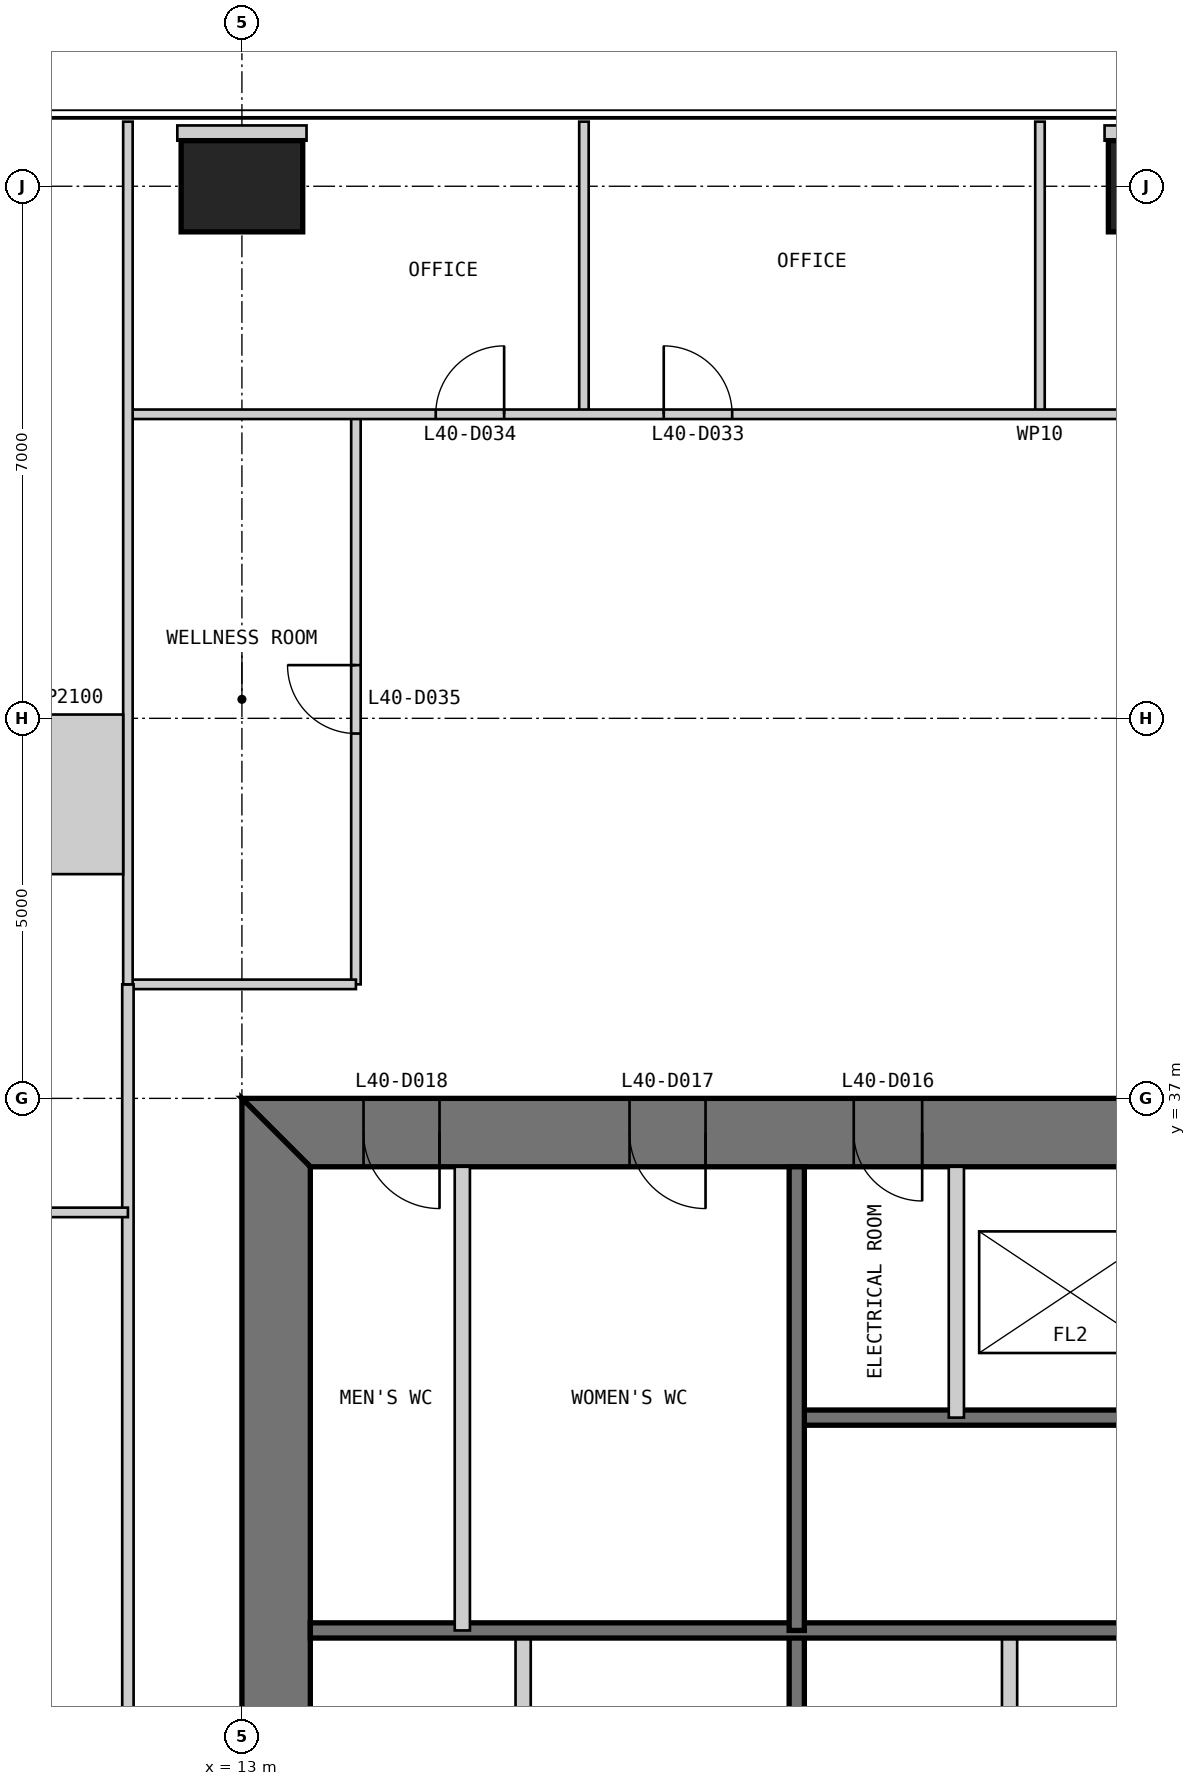
"""IFC4 building model, lengths in metres.
Left out: names, types, materials, properties, quantities, classifications, styles, units other than length and angle.
Written with IfcOpenShell. Run it as: python <this file> out.ifc"""

import sys

from ifc_helpers import new_model, si_unit, direction, frame, frame_2d, origin, origin_2d, place, context, subcontext, project, spatial, polyline, rectangle, outline, extrude, element, fill, save


model = new_model("IFC4")
c1 = context("Model", 3, precision=1e-05, world=origin(), true_north=direction((0.0, 1.0)))
c2 = subcontext(c1, "Body", "Model", "MODEL_VIEW")
j1 = project(units=[si_unit("LENGTHUNIT", "METRE"), si_unit("PLANEANGLEUNIT", "RADIAN")], contexts=[c1])
p1 = place(None, origin())
s1 = spatial("IfcSite", under=j1, at=p1, CompositionType="ELEMENT")
p2 = place(p1, origin())
s2 = spatial("IfcBuilding", under=s1, at=p2, CompositionType="ELEMENT")
p3 = place(p2, frame((0.0, 0.0, 173.8)))
s3 = spatial("IfcBuildingStorey", under=s2, at=p3, CompositionType="ELEMENT", Elevation=173.8)
p4 = place(p3, frame((25.0, 49.0, 0.0), z_axis=(0.0, 0.0, 1.0), x_axis=(1.0, 0.0, 0.0)))
e1 = element("IfcColumn", 1, at=p4, inside=s3, PredefinedType="COLUMN", context=c2, shape_type="SweptSolid", body=[
    extrude(rectangle(XDim=1.2, YDim=1.2, at=origin_2d()), origin(), (0.0, 0.0, 1.0), 4.0),
])
p5 = place(p3, frame((13.0, 49.0, 0.0), z_axis=(0.0, 0.0, 1.0), x_axis=(1.0, 0.0, 0.0)))
e2 = element("IfcColumn", 2, at=p5, inside=s3, PredefinedType="COLUMN", context=c2, shape_type="SweptSolid", body=[
    extrude(rectangle(XDim=1.6, YDim=1.2, at=origin_2d()), origin(), (0.0, 0.0, 1.0), 4.0),
])
p6 = place(p3, frame((37.0, 36.55, 0.0), z_axis=(0.0, 0.0, 1.0), x_axis=(-1.0, 0.0, 0.0)))
e3 = element("IfcWall", 3, at=p6, inside=s3, PredefinedType="SHEAR", context=c2, shape_type="SweptSolid", body=[
    extrude(outline(polyline([(0.0, -0.45), (24.0, -0.45), (23.1, 0.45), (0.9, 0.45), (0.0, -0.45)])), origin(), (0.0, 0.0, 1.0), 4.0),
])
p7 = place(p6, frame((4.9, 0.0, 0.0)))
e4 = element("IfcOpeningElement", 4, at=p7, cuts=e3, PredefinedType="OPENING", context=c2, shape_type="SweptSolid", body=[
    extrude(rectangle(XDim=1.0, YDim=2.2, at=frame_2d((0.5, 1.1))), frame((0.0, 0.46, 0.0), z_axis=(0.0, -1.0, 0.0), x_axis=(1.0, 0.0, 0.0)), (0.0, 0.0, 1.0), 0.92),
])
p8 = place(p6, frame((8.9, 0.0, 0.0)))
e5 = element("IfcOpeningElement", 5, at=p8, cuts=e3, PredefinedType="OPENING", context=c2, shape_type="SweptSolid", body=[
    extrude(rectangle(XDim=1.1, YDim=2.2, at=frame_2d((0.55, 1.1))), frame((0.0, 0.46, 0.0), z_axis=(0.0, -1.0, 0.0), x_axis=(1.0, 0.0, 0.0)), (0.0, 0.0, 1.0), 0.92),
])
p9 = place(p6, frame((15.05, 0.0, 0.0)))
e6 = element("IfcOpeningElement", 6, at=p9, cuts=e3, PredefinedType="OPENING", context=c2, shape_type="SweptSolid", body=[
    extrude(rectangle(XDim=0.9, YDim=2.2, at=frame_2d((0.45, 1.1))), frame((0.0, 0.46, 0.0), z_axis=(0.0, -1.0, 0.0), x_axis=(1.0, 0.0, 0.0)), (0.0, 0.0, 1.0), 0.92),
])
p10 = place(p6, frame((17.9, 0.0, 0.0)))
e7 = element("IfcOpeningElement", 7, at=p10, cuts=e3, PredefinedType="OPENING", context=c2, shape_type="SweptSolid", body=[
    extrude(rectangle(XDim=1.0, YDim=2.2, at=frame_2d((0.5, 1.1))), frame((0.0, 0.46, 0.0), z_axis=(0.0, -1.0, 0.0), x_axis=(1.0, 0.0, 0.0)), (0.0, 0.0, 1.0), 0.92),
])
p11 = place(p6, frame((21.4, 0.0, 0.0)))
e8 = element("IfcOpeningElement", 8, at=p11, cuts=e3, PredefinedType="OPENING", context=c2, shape_type="SweptSolid", body=[
    extrude(rectangle(XDim=1.0, YDim=2.2, at=frame_2d((0.5, 1.1))), frame((0.0, 0.46, 0.0), z_axis=(0.0, -1.0, 0.0), x_axis=(1.0, 0.0, 0.0)), (0.0, 0.0, 1.0), 0.92),
])
p12 = place(p3, frame((13.45, 36.1, 0.0), z_axis=(0.0, 0.0, 1.0), x_axis=(0.0, -1.0, 0.0)))
e9 = element("IfcWall", 9, at=p12, inside=s3, PredefinedType="SHEAR", context=c2, shape_type="SweptSolid", body=[
    extrude(outline(polyline([(-0.9, -0.45), (23.1, -0.45), (22.2, 0.45), (0.0, 0.45), (-0.9, -0.45)])), origin(), (0.0, 0.0, 1.0), 4.0),
])
p13 = place(p12, frame((20.2, 0.0, 0.0)))
e10 = element("IfcOpeningElement", 10, at=p13, cuts=e9, PredefinedType="OPENING", context=c2, shape_type="SweptSolid", body=[
    extrude(rectangle(XDim=1.0, YDim=2.2, at=frame_2d((0.5, 1.1))), frame((0.0, 0.46, 0.0), z_axis=(0.0, -1.0, 0.0), x_axis=(1.0, 0.0, 0.0)), (0.0, 0.0, 1.0), 0.92),
])
p14 = place(p12, frame((17.25, 0.0, 0.0)))
e11 = element("IfcOpeningElement", 11, at=p14, cuts=e9, PredefinedType="OPENING", context=c2, shape_type="SweptSolid", body=[
    extrude(rectangle(XDim=0.9, YDim=2.2, at=frame_2d((0.45, 1.1))), frame((0.0, 0.46, 0.0), z_axis=(0.0, -1.0, 0.0), x_axis=(1.0, 0.0, 0.0)), (0.0, 0.0, 1.0), 0.92),
])
p15 = place(p3, frame((16.7, 13.9, 0.0), z_axis=(0.0, 0.0, 1.0), x_axis=(0.0, 1.0, 0.0)))
e12 = element("IfcWall", 12, at=p15, inside=s3, PredefinedType="PARTITIONING", context=c2, shape_type="SweptSolid", body=[
    extrude(rectangle(XDim=16.1, YDim=0.2, at=frame_2d((8.05, 0.0))), origin(), (0.0, 0.0, 1.0), 3.8),
])
p16 = place(p15, frame((7.4, 0.0, 0.0)))
e13 = element("IfcOpeningElement", 13, at=p16, cuts=e12, PredefinedType="OPENING", context=c2, shape_type="SweptSolid", body=[
    extrude(rectangle(XDim=0.9, YDim=2.2, at=frame_2d((0.45, 1.1))), frame((0.0, 0.11, 0.0), z_axis=(0.0, -1.0, 0.0), x_axis=(1.0, 0.0, 0.0)), (0.0, 0.0, 1.0), 0.22),
])
p17 = place(p15, frame((12.4, 0.0, 0.0)))
e14 = element("IfcOpeningElement", 14, at=p17, cuts=e12, PredefinedType="OPENING", context=c2, shape_type="SweptSolid", body=[
    extrude(rectangle(XDim=0.9, YDim=2.2, at=frame_2d((0.45, 1.1))), frame((0.0, 0.11, 0.0), z_axis=(0.0, -1.0, 0.0), x_axis=(1.0, 0.0, 0.0)), (0.0, 0.0, 1.0), 0.22),
])
p18 = place(p3, frame((20.3, 13.9, 0.0), z_axis=(0.0, 0.0, 1.0), x_axis=(0.0, 1.0, 0.0)))
e15 = element("IfcWall", 15, at=p18, inside=s3, PredefinedType="SOLIDWALL", context=c2, shape_type="SweptSolid", body=[
    extrude(rectangle(XDim=16.1, YDim=0.2, at=frame_2d((8.05, 0.0))), origin(), (0.0, 0.0, 1.0), 3.8),
])
p19 = place(p18, frame((6.4, 0.0, 0.0)))
e16 = element("IfcOpeningElement", 16, at=p19, cuts=e15, PredefinedType="OPENING", context=c2, shape_type="SweptSolid", body=[
    extrude(rectangle(XDim=0.9, YDim=2.2, at=frame_2d((0.45, 1.1))), frame((0.0, 0.11, 0.0), z_axis=(0.0, -1.0, 0.0), x_axis=(1.0, 0.0, 0.0)), (0.0, 0.0, 1.0), 0.22),
])
p20 = place(p18, frame((11.4, 0.0, 0.0)))
e17 = element("IfcOpeningElement", 17, at=p20, cuts=e15, PredefinedType="OPENING", context=c2, shape_type="SweptSolid", body=[
    extrude(rectangle(XDim=0.9, YDim=2.2, at=frame_2d((0.45, 1.1))), frame((0.0, 0.11, 0.0), z_axis=(0.0, -1.0, 0.0), x_axis=(1.0, 0.0, 0.0)), (0.0, 0.0, 1.0), 0.22),
])
p21 = place(p3, frame((23.1, 20.0, 0.0), z_axis=(0.0, 0.0, 1.0), x_axis=(0.0, 1.0, 0.0)))
e18 = element("IfcWall", 18, at=p21, inside=s3, PredefinedType="PARTITIONING", context=c2, shape_type="SweptSolid", body=[
    extrude(rectangle(XDim=10.0, YDim=0.2, at=frame_2d((5.0, 0.0))), origin(), (0.0, 0.0, 1.0), 3.8),
])
p22 = place(p3, frame((29.7, 32.8, 0.0), z_axis=(0.0, 0.0, 1.0), x_axis=(-1.0, 0.0, 0.0)))
e19 = element("IfcWall", 19, at=p22, inside=s3, PredefinedType="SOLIDWALL", context=c2, shape_type="SweptSolid", body=[
    extrude(rectangle(XDim=9.4, YDim=0.2, at=frame_2d((4.7, 0.0))), origin(), (0.0, 0.0, 1.0), 3.8),
])
p23 = place(p22, frame((0.25, 0.0, 0.0)))
e20 = element("IfcOpeningElement", 20, at=p23, cuts=e19, PredefinedType="OPENING", context=c2, shape_type="SweptSolid", body=[
    extrude(rectangle(XDim=1.0, YDim=2.2, at=frame_2d((0.5, 1.1))), frame((0.0, 0.11, 0.0), z_axis=(0.0, -1.0, 0.0), x_axis=(1.0, 0.0, 0.0)), (0.0, 0.0, 1.0), 0.22),
])
p24 = place(p3, frame((29.7, 30.0, 0.0), z_axis=(0.0, 0.0, 1.0), x_axis=(-1.0, 0.0, 0.0)))
e21 = element("IfcWall", 21, at=p24, inside=s3, PredefinedType="SOLIDWALL", context=c2, shape_type="SweptSolid", body=[
    extrude(rectangle(XDim=15.8, YDim=0.2, at=frame_2d((7.9, 0.0))), origin(), (0.0, 0.0, 1.0), 3.8),
])
p25 = place(p3, frame((22.4, 36.1, 0.0), z_axis=(0.0, 0.0, 1.0), x_axis=(0.0, -1.0, 0.0)))
e22 = element("IfcWall", 22, at=p25, inside=s3, PredefinedType="PARTITIONING", context=c2, shape_type="SweptSolid", body=[
    extrude(rectangle(XDim=3.3, YDim=0.2, at=frame_2d((1.65, 0.0))), origin(), (0.0, 0.0, 1.0), 3.8),
])
p26 = place(p3, frame((20.3, 36.1, 0.0), z_axis=(0.0, 0.0, 1.0), x_axis=(0.0, -1.0, 0.0)))
e23 = element("IfcWall", 23, at=p26, inside=s3, PredefinedType="SOLIDWALL", context=c2, shape_type="SweptSolid", body=[
    extrude(rectangle(XDim=6.1, YDim=0.2, at=frame_2d((3.05, 0.0))), origin(), (0.0, 0.0, 1.0), 3.8),
])
p27 = place(p3, frame((15.9, 36.1, 0.0), z_axis=(0.0, 0.0, 1.0), x_axis=(0.0, -1.0, 0.0)))
e24 = element("IfcWall", 24, at=p27, inside=s3, PredefinedType="PARTITIONING", context=c2, shape_type="SweptSolid", body=[
    extrude(rectangle(XDim=6.1, YDim=0.2, at=frame_2d((3.05, 0.0))), origin(), (0.0, 0.0, 1.0), 3.8),
])
for number, where, z_axis, x_axis in (
    (25, (23.5, 49.85, 0.0), (0.0, 0.0, 1.0), (0.0, -1.0, 0.0)),
    (26, (17.5, 49.85, 0.0), (0.0, 0.0, 1.0), (0.0, -1.0, 0.0)),
):
    element("IfcWall", number, at=place(p3, frame(where, z_axis=z_axis, x_axis=x_axis)), inside=s3, PredefinedType="PARTITIONING", context=c2, shape_type="SweptSolid", body=[
        extrude(rectangle(XDim=3.85, YDim=0.125, at=frame_2d((1.925, 0.0))), origin(), (0.0, 0.0, 1.0), 3.85),
    ])
p28 = place(p3, frame((14.5, 46.0, 0.0), z_axis=(0.0, 0.0, 1.0), x_axis=(0.0, -1.0, 0.0)))
e27 = element("IfcWall", 27, at=p28, inside=s3, PredefinedType="PARTITIONING", context=c2, shape_type="SweptSolid", body=[
    extrude(rectangle(XDim=7.5, YDim=0.125, at=frame_2d((3.75, 0.0))), origin(), (0.0, 0.0, 1.0), 3.85),
])
p29 = place(p28, frame((3.3, 0.0, 0.0)))
e28 = element("IfcOpeningElement", 28, at=p29, cuts=e27, PredefinedType="OPENING", context=c2, shape_type="SweptSolid", body=[
    extrude(rectangle(XDim=0.9, YDim=2.2, at=frame_2d((0.45, 1.1))), frame((0.0, 0.073, 0.0), z_axis=(0.0, -1.0, 0.0), x_axis=(1.0, 0.0, 0.0)), (0.0, 0.0, 1.0), 0.145),
])
p30 = place(p3, frame((35.5, 46.0, 0.0), z_axis=(0.0, 0.0, 1.0), x_axis=(-1.0, 0.0, 0.0)))
e29 = element("IfcWall", 29, at=p30, inside=s3, PredefinedType="PARTITIONING", context=c2, shape_type="SweptSolid", body=[
    extrude(rectangle(XDim=24.0, YDim=0.125, at=frame_2d((12.0, 0.0))), origin(), (0.0, 0.0, 1.0), 3.85),
])
p31 = place(p30, frame((16.05, 0.0, 0.0)))
e30 = element("IfcOpeningElement", 30, at=p31, cuts=e29, PredefinedType="OPENING", context=c2, shape_type="SweptSolid", body=[
    extrude(rectangle(XDim=0.9, YDim=2.2, at=frame_2d((0.45, 1.1))), frame((0.0, 0.073, 0.0), z_axis=(0.0, -1.0, 0.0), x_axis=(1.0, 0.0, 0.0)), (0.0, 0.0, 1.0), 0.145),
])
p32 = place(p30, frame((19.05, 0.0, 0.0)))
e31 = element("IfcOpeningElement", 31, at=p32, cuts=e29, PredefinedType="OPENING", context=c2, shape_type="SweptSolid", body=[
    extrude(rectangle(XDim=0.9, YDim=2.2, at=frame_2d((0.45, 1.1))), frame((0.0, 0.073, 0.0), z_axis=(0.0, -1.0, 0.0), x_axis=(1.0, 0.0, 0.0)), (0.0, 0.0, 1.0), 0.145),
])
p33 = place(p3, frame((14.5, 38.5, 0.0), z_axis=(0.0, 0.0, 1.0), x_axis=(-1.0, 0.0, 0.0)))
e32 = element("IfcWall", 32, at=p33, inside=s3, PredefinedType="PARTITIONING", context=c2, shape_type="SweptSolid", body=[
    extrude(rectangle(XDim=3.0, YDim=0.125, at=frame_2d((1.5, 0.0))), origin(), (0.0, 0.0, 1.0), 3.85),
])
p34 = place(p3, frame((11.5, 38.5, 0.0), z_axis=(0.0, 0.0, 1.0), x_axis=(0.0, -1.0, 0.0)))
e33 = element("IfcWall", 33, at=p34, inside=s3, PredefinedType="PARTITIONING", context=c2, shape_type="SweptSolid", body=[
    extrude(rectangle(XDim=27.0, YDim=0.15, at=frame_2d((13.5, 0.0))), origin(), (0.0, 0.0, 1.0), 3.85),
])
p35 = place(p34, frame((13.0, 0.0, 0.0)))
e34 = element("IfcOpeningElement", 34, at=p35, cuts=e33, PredefinedType="OPENING", context=c2, shape_type="SweptSolid", body=[
    extrude(rectangle(XDim=1.0, YDim=2.2, at=frame_2d((0.5, 1.1))), frame((0.0, 0.085, 0.0), z_axis=(0.0, -1.0, 0.0), x_axis=(1.0, 0.0, 0.0)), (0.0, 0.0, 1.0), 0.17),
])
p36 = place(p3, frame((11.5, 49.85, 0.0), z_axis=(0.0, 0.0, 1.0), x_axis=(0.0, -1.0, 0.0)))
e35 = element("IfcWall", 35, at=p36, inside=s3, PredefinedType="PARTITIONING", context=c2, shape_type="SweptSolid", body=[
    extrude(rectangle(XDim=11.35, YDim=0.125, at=frame_2d((5.675, 0.0))), origin(), (0.0, 0.0, 1.0), 3.85),
])
p37 = place(p3, frame((0.15, 35.5, 0.0), z_axis=(0.0, 0.0, 1.0), x_axis=(1.0, 0.0, 0.0)))
e36 = element("IfcWall", 36, at=p37, inside=s3, PredefinedType="PARTITIONING", context=c2, shape_type="SweptSolid", body=[
    extrude(rectangle(XDim=11.35, YDim=0.125, at=frame_2d((5.675, 0.0))), origin(), (0.0, 0.0, 1.0), 3.85),
])
p38 = place(p37, frame((7.1, 0.0, 0.0)))
e37 = element("IfcOpeningElement", 37, at=p38, cuts=e36, PredefinedType="OPENING", context=c2, shape_type="SweptSolid", body=[
    extrude(rectangle(XDim=1.0, YDim=2.2, at=frame_2d((0.5, 1.1))), frame((0.0, 0.073, 0.0), z_axis=(0.0, -1.0, 0.0), x_axis=(1.0, 0.0, 0.0)), (0.0, 0.0, 1.0), 0.145),
])
p39 = place(p3, frame((25.0, 49.8, 0.0), z_axis=(0.0, 0.0, 1.0), x_axis=(0.0, -1.0, 0.0)))
e38 = element("IfcWall", 38, at=p39, inside=s3, PredefinedType="PARTITIONING", context=c2, shape_type="SweptSolid", body=[
    extrude(rectangle(XDim=0.2, YDim=1.3, at=frame_2d((0.1, 0.0))), origin(), (0.0, 0.0, 1.0), 3.85),
])
p40 = place(p3, frame((13.0, 49.8, 0.0), z_axis=(0.0, 0.0, 1.0), x_axis=(0.0, -1.0, 0.0)))
e39 = element("IfcWall", 39, at=p40, inside=s3, PredefinedType="PARTITIONING", context=c2, shape_type="SweptSolid", body=[
    extrude(rectangle(XDim=0.2, YDim=1.7, at=frame_2d((0.1, 0.0))), origin(), (0.0, 0.0, 1.0), 3.85),
])
p41 = place(p3, frame((11.438, 41.0, 0.0), z_axis=(0.0, 0.0, 1.0), x_axis=(-1.0, 0.0, 0.0)))
e40 = element("IfcWall", 40, at=p41, inside=s3, PredefinedType="PARTITIONING", context=c2, shape_type="SweptSolid", body=[
    extrude(rectangle(XDim=1.438, YDim=2.1, at=frame_2d((0.719, 0.0))), origin(), (0.0, 0.0, 1.0), 3.85),
])
p42 = place(p9, origin())
e41 = element("IfcDoor", 41, at=p42, inside=s3, OperationType="SINGLE_SWING_LEFT", PredefinedType="DOOR", context=c2, shape_type="SweptSolid", body=[
    extrude(rectangle(XDim=0.9, YDim=2.2, at=frame_2d((0.45, 1.1))), frame((0.0, 0.025, 0.0), z_axis=(0.0, -1.0, 0.0), x_axis=(1.0, 0.0, 0.0)), (0.0, 0.0, 1.0), 0.05),
    extrude(outline(polyline([(0.0, 0.0), (0.04, 0.0), (0.04, 2.16), (0.86, 2.16), (0.86, 0.0), (0.9, 0.0), (0.9, 2.2), (0.0, 2.2), (0.0, 0.0)])), frame((0.0, 0.3, 0.0), z_axis=(0.0, -1.0, 0.0), x_axis=(1.0, 0.0, 0.0)), (0.0, 0.0, 1.0), 0.6),
])
fill(e6, e41)
p43 = place(p10, origin())
e42 = element("IfcDoor", 42, at=p43, inside=s3, OperationType="SINGLE_SWING_LEFT", PredefinedType="DOOR", context=c2, shape_type="SweptSolid", body=[
    extrude(rectangle(XDim=1.0, YDim=2.2, at=frame_2d((0.5, 1.1))), frame((0.0, 0.025, 0.0), z_axis=(0.0, -1.0, 0.0), x_axis=(1.0, 0.0, 0.0)), (0.0, 0.0, 1.0), 0.05),
    extrude(outline(polyline([(0.0, 0.0), (0.04, 0.0), (0.04, 2.16), (0.96, 2.16), (0.96, 0.0), (1.0, 0.0), (1.0, 2.2), (0.0, 2.2), (0.0, 0.0)])), frame((0.0, 0.3, 0.0), z_axis=(0.0, -1.0, 0.0), x_axis=(1.0, 0.0, 0.0)), (0.0, 0.0, 1.0), 0.6),
])
fill(e7, e42)
p44 = place(p11, origin())
e43 = element("IfcDoor", 43, at=p44, inside=s3, OperationType="SINGLE_SWING_LEFT", PredefinedType="DOOR", context=c2, shape_type="SweptSolid", body=[
    extrude(rectangle(XDim=1.0, YDim=2.2, at=frame_2d((0.5, 1.1))), frame((0.0, 0.025, 0.0), z_axis=(0.0, -1.0, 0.0), x_axis=(1.0, 0.0, 0.0)), (0.0, 0.0, 1.0), 0.05),
    extrude(outline(polyline([(0.0, 0.0), (0.04, 0.0), (0.04, 2.16), (0.96, 2.16), (0.96, 0.0), (1.0, 0.0), (1.0, 2.2), (0.0, 2.2), (0.0, 0.0)])), frame((0.0, 0.3, 0.0), z_axis=(0.0, -1.0, 0.0), x_axis=(1.0, 0.0, 0.0)), (0.0, 0.0, 1.0), 0.6),
])
fill(e8, e43)
p45 = place(p31, frame((0.9, 0.0, 0.0), z_axis=(0.0, 0.0, 1.0), x_axis=(-1.0, 0.0, 0.0)))
e44 = element("IfcDoor", 44, at=p45, inside=s3, OperationType="SINGLE_SWING_LEFT", PredefinedType="DOOR", context=c2, shape_type="SweptSolid", body=[
    extrude(rectangle(XDim=0.9, YDim=2.2, at=frame_2d((0.45, 1.1))), frame((0.0, 0.025, 0.0), z_axis=(0.0, -1.0, 0.0), x_axis=(1.0, 0.0, 0.0)), (0.0, 0.0, 1.0), 0.05),
])
fill(e30, e44)
p46 = place(p32, frame((0.9, 0.0, 0.0), z_axis=(0.0, 0.0, 1.0), x_axis=(-1.0, 0.0, 0.0)))
e45 = element("IfcDoor", 45, at=p46, inside=s3, OperationType="SINGLE_SWING_RIGHT", PredefinedType="DOOR", context=c2, shape_type="SweptSolid", body=[
    extrude(rectangle(XDim=0.9, YDim=2.2, at=frame_2d((0.45, 1.1))), frame((0.0, 0.025, 0.0), z_axis=(0.0, -1.0, 0.0), x_axis=(1.0, 0.0, 0.0)), (0.0, 0.0, 1.0), 0.05),
])
fill(e31, e45)
p47 = place(p29, frame((0.9, 0.0, 0.0), z_axis=(0.0, 0.0, 1.0), x_axis=(-1.0, 0.0, 0.0)))
e46 = element("IfcDoor", 46, at=p47, inside=s3, OperationType="SINGLE_SWING_RIGHT", PredefinedType="DOOR", context=c2, shape_type="SweptSolid", body=[
    extrude(rectangle(XDim=0.9, YDim=2.2, at=frame_2d((0.45, 1.1))), frame((0.0, 0.025, 0.0), z_axis=(0.0, -1.0, 0.0), x_axis=(1.0, 0.0, 0.0)), (0.0, 0.0, 1.0), 0.05),
])
fill(e28, e46)
save(model, sys.argv[1])
